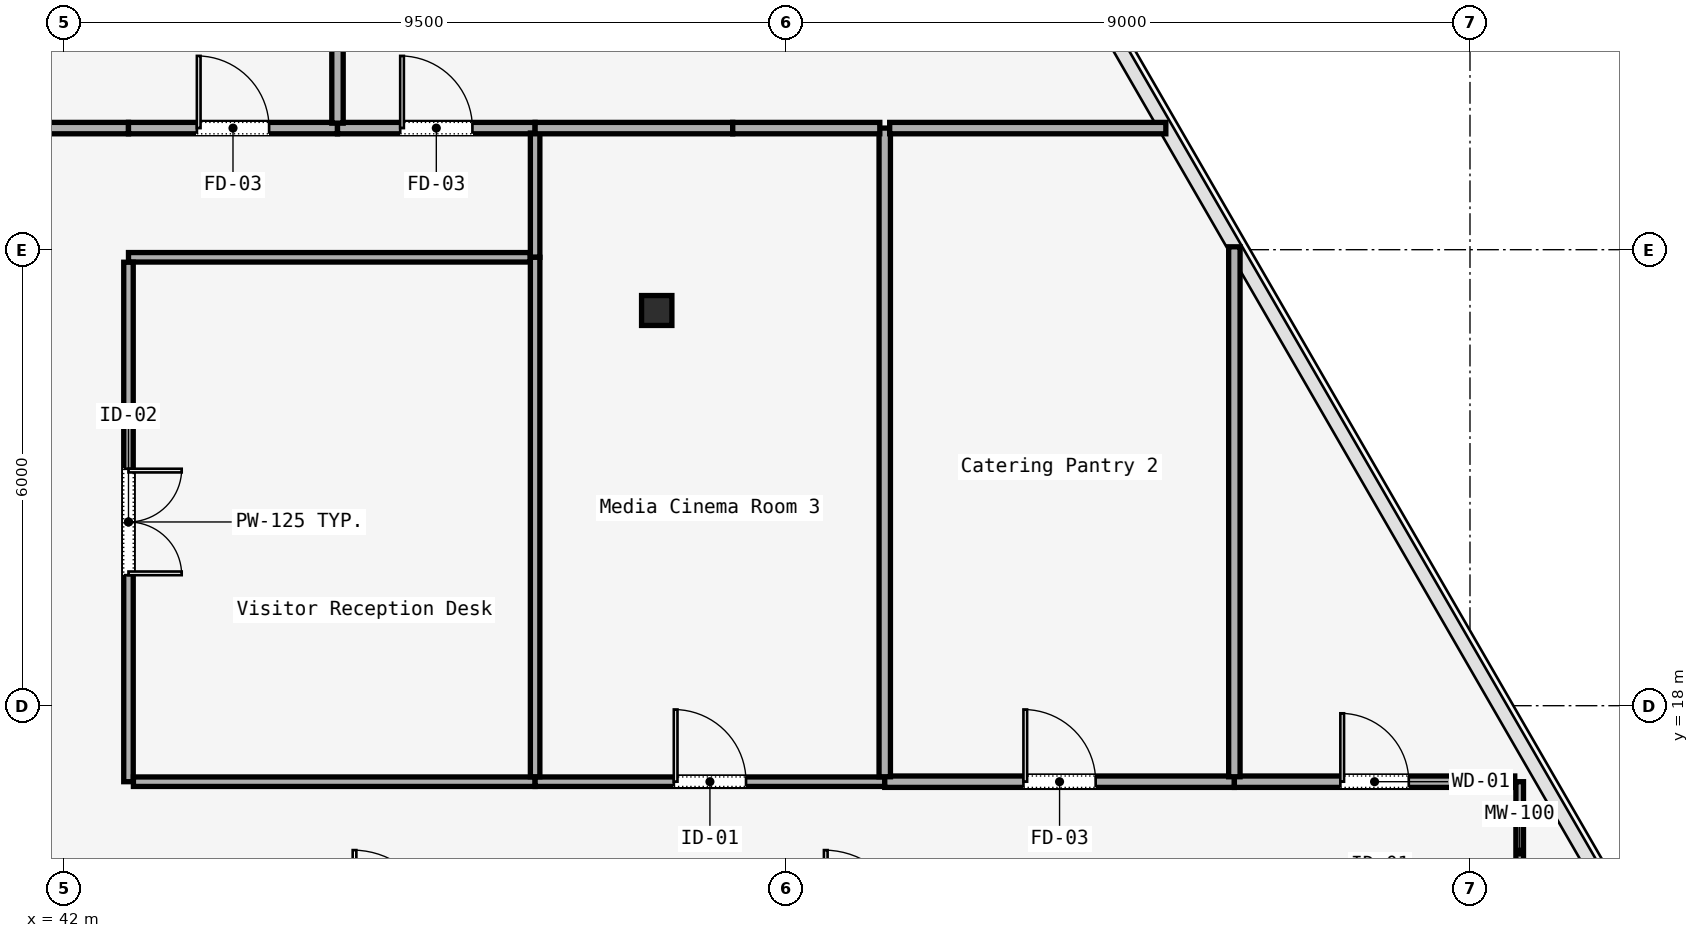
"""IFC4 building model, lengths in metres.
Left out: names, types, materials, properties, quantities, classifications, styles, units other than length and angle.
Written with IfcOpenShell. Run it as: python <this file> out.ifc"""

import sys

from ifc_helpers import new_model, si_unit, direction, frame, frame_2d, origin, origin_2d, place, context, subcontext, project, spatial, rectangle, i_section, extrude, element, fill, save


model = new_model("IFC4")
c1 = context("Model", 3, precision=1e-05, world=origin(), true_north=direction((0.0, 1.0)))
c2 = subcontext(c1, "Body", "Model", "MODEL_VIEW")
j1 = project(units=[si_unit("LENGTHUNIT", "METRE"), si_unit("PLANEANGLEUNIT", "RADIAN")], contexts=[c1])
p1 = place(None, origin())
s1 = spatial("IfcSite", under=j1, at=p1, CompositionType="ELEMENT")
p2 = place(p1, origin())
s2 = spatial("IfcBuilding", under=s1, at=p2, CompositionType="ELEMENT")
p3 = place(p2, frame((0.0, 0.0, 248.4)))
s3 = spatial("IfcBuildingStorey", under=s2, at=p3, CompositionType="ELEMENT", Elevation=248.4)
p4 = place(p3, frame((49.8, 23.2, 0.0), z_axis=(0.0, 0.0, 1.0), x_axis=(1.0, 0.0, 0.0)))
e1 = element("IfcColumn", 1, at=p4, inside=s3, PredefinedType="COLUMN", context=c2, shape_type="SweptSolid", body=[
    extrude(i_section(OverallWidth=0.399, OverallDepth=0.394, WebThickness=0.023, FlangeThickness=0.037, FilletRadius=0.015, at=origin_2d()), origin(), (0.0, 0.0, 1.0), 3.58),
])
p5 = place(p3, frame((61.154, 17.0, 0.0), z_axis=(0.0, 0.0, 1.0), x_axis=(0.0, -1.0, 0.0)))
e2 = element("IfcWall", 2, at=p5, inside=s3, PredefinedType="MOVABLE", context=c2, shape_type="SweptSolid", body=[
    extrude(rectangle(XDim=1.85, YDim=0.1, at=frame_2d((0.925, 0.0))), origin(), (0.0, 0.0, 1.0), 3.01),
])
p6 = place(p3, frame((41.15, 25.6, 0.0), z_axis=(0.0, 0.0, 1.0), x_axis=(1.0, 0.0, 0.0)))
e3 = element("IfcWall", 3, at=p6, inside=s3, PredefinedType="PARTITIONING", context=c2, shape_type="SweptSolid", body=[
    extrude(rectangle(XDim=1.7, YDim=0.15, at=frame_2d((0.85, 0.0))), origin(), (0.0, 0.0, 1.0), 3.01),
])
p7 = place(p3, frame((42.85, 25.6, 0.0), z_axis=(0.0, 0.0, 1.0), x_axis=(1.0, 0.0, 0.0)))
e4 = element("IfcWall", 4, at=p7, inside=s3, PredefinedType="PARTITIONING", context=c2, shape_type="SweptSolid", body=[
    extrude(rectangle(XDim=2.75, YDim=0.15, at=frame_2d((1.375, 0.0))), origin(), (0.0, 0.0, 1.0), 3.01),
])
p8 = place(p7, frame((0.9, 0.0, 0.0)))
e5 = element("IfcOpeningElement", 5, at=p8, cuts=e4, PredefinedType="OPENING", context=c2, shape_type="SweptSolid", body=[
    extrude(rectangle(XDim=0.95, YDim=2.2, at=frame_2d((0.475, 1.1))), frame((0.0, 0.075, 0.0), z_axis=(0.0, -1.0, 0.0), x_axis=(1.0, 0.0, 0.0)), (0.0, 0.0, 1.0), 0.15),
])
p9 = place(p3, frame((45.6, 25.6, 0.0), z_axis=(0.0, 0.0, 1.0), x_axis=(1.0, 0.0, 0.0)))
e6 = element("IfcWall", 6, at=p9, inside=s3, PredefinedType="PARTITIONING", context=c2, shape_type="SweptSolid", body=[
    extrude(rectangle(XDim=2.6, YDim=0.15, at=frame_2d((1.3, 0.0))), origin(), (0.0, 0.0, 1.0), 3.01),
])
p10 = place(p9, frame((0.825, 0.0, 0.0)))
e7 = element("IfcOpeningElement", 7, at=p10, cuts=e6, PredefinedType="OPENING", context=c2, shape_type="SweptSolid", body=[
    extrude(rectangle(XDim=0.95, YDim=2.2, at=frame_2d((0.475, 1.1))), frame((0.0, 0.075, 0.0), z_axis=(0.0, -1.0, 0.0), x_axis=(1.0, 0.0, 0.0)), (0.0, 0.0, 1.0), 0.15),
])
p11 = place(p3, frame((48.2, 25.535, 0.0), z_axis=(0.0, 0.0, 1.0), x_axis=(0.0, -1.0, 0.0)))
e8 = element("IfcWall", 8, at=p11, inside=s3, PredefinedType="PARTITIONING", context=c2, shape_type="SweptSolid", body=[
    extrude(rectangle(XDim=1.635, YDim=0.125, at=frame_2d((0.817, 0.0))), origin(), (0.0, 0.0, 1.0), 3.01),
])
p12 = place(p3, frame((48.135, 23.9, 0.0), z_axis=(0.0, 0.0, 1.0), x_axis=(-1.0, 0.0, 0.0)))
e9 = element("IfcWall", 9, at=p12, inside=s3, PredefinedType="PARTITIONING", context=c2, shape_type="SweptSolid", body=[
    extrude(rectangle(XDim=5.285, YDim=0.125, at=frame_2d((2.643, 0.0))), origin(), (0.0, 0.0, 1.0), 3.01),
])
p13 = place(p3, frame((42.85, 23.835, 0.0), z_axis=(0.0, 0.0, 1.0), x_axis=(0.0, -1.0, 0.0)))
e10 = element("IfcWall", 10, at=p13, inside=s3, PredefinedType="PARTITIONING", context=c2, shape_type="SweptSolid", body=[
    extrude(rectangle(XDim=6.835, YDim=0.125, at=frame_2d((3.417, 0.0))), origin(), (0.0, 0.0, 1.0), 3.01),
])
p14 = place(p13, frame((2.718, 0.0, 0.0)))
e11 = element("IfcOpeningElement", 11, at=p14, cuts=e10, PredefinedType="OPENING", context=c2, shape_type="SweptSolid", body=[
    extrude(rectangle(XDim=1.4, YDim=2.2, at=frame_2d((0.7, 1.1))), frame((0.0, 0.062, 0.0), z_axis=(0.0, -1.0, 0.0), x_axis=(1.0, 0.0, 0.0)), (0.0, 0.0, 1.0), 0.125),
])
p15 = place(p3, frame((42.915, 17.0, 0.0), z_axis=(0.0, 0.0, 1.0), x_axis=(1.0, 0.0, 0.0)))
e12 = element("IfcWall", 12, at=p15, inside=s3, PredefinedType="PARTITIONING", context=c2, shape_type="SweptSolid", body=[
    extrude(rectangle(XDim=5.285, YDim=0.125, at=frame_2d((2.643, 0.0))), origin(), (0.0, 0.0, 1.0), 3.01),
])
p16 = place(p3, frame((48.2, 17.0, 0.0), z_axis=(0.0, 0.0, 1.0), x_axis=(1.0, 0.0, 0.0)))
e13 = element("IfcWall", 13, at=p16, inside=s3, PredefinedType="PARTITIONING", context=c2, shape_type="SweptSolid", body=[
    extrude(rectangle(XDim=4.6, YDim=0.125, at=frame_2d((2.3, 0.0))), origin(), (0.0, 0.0, 1.0), 3.01),
])
p17 = place(p16, frame((1.825, 0.0, 0.0)))
e14 = element("IfcOpeningElement", 14, at=p17, cuts=e13, PredefinedType="OPENING", context=c2, shape_type="SweptSolid", body=[
    extrude(rectangle(XDim=0.95, YDim=2.2, at=frame_2d((0.475, 1.1))), frame((0.0, 0.062, 0.0), z_axis=(0.0, -1.0, 0.0), x_axis=(1.0, 0.0, 0.0)), (0.0, 0.0, 1.0), 0.125),
])
p18 = place(p3, frame((52.8, 17.0, 0.0), z_axis=(0.0, 0.0, 1.0), x_axis=(1.0, 0.0, 0.0)))
e15 = element("IfcWall", 15, at=p18, inside=s3, PredefinedType="PARTITIONING", context=c2, shape_type="SweptSolid", body=[
    extrude(rectangle(XDim=4.6, YDim=0.15, at=frame_2d((2.3, 0.0))), origin(), (0.0, 0.0, 1.0), 3.01),
])
p19 = place(p18, frame((1.825, 0.0, 0.0)))
e16 = element("IfcOpeningElement", 16, at=p19, cuts=e15, PredefinedType="OPENING", context=c2, shape_type="SweptSolid", body=[
    extrude(rectangle(XDim=0.95, YDim=2.2, at=frame_2d((0.475, 1.1))), frame((0.0, 0.075, 0.0), z_axis=(0.0, -1.0, 0.0), x_axis=(1.0, 0.0, 0.0)), (0.0, 0.0, 1.0), 0.15),
])
p20 = place(p3, frame((57.4, 17.0, 0.0), z_axis=(0.0, 0.0, 1.0), x_axis=(1.0, 0.0, 0.0)))
e17 = element("IfcWall", 17, at=p20, inside=s3, PredefinedType="PARTITIONING", context=c2, shape_type="SweptSolid", body=[
    extrude(rectangle(XDim=3.689, YDim=0.15, at=frame_2d((1.845, 0.0))), origin(), (0.0, 0.0, 1.0), 3.01),
])
p21 = place(p20, frame((1.395, 0.0, 0.0)))
e18 = element("IfcOpeningElement", 18, at=p21, cuts=e17, PredefinedType="OPENING", context=c2, shape_type="SweptSolid", body=[
    extrude(rectangle(XDim=0.9, YDim=2.15, at=frame_2d((0.45, 1.075))), frame((0.0, 0.075, 0.0), z_axis=(0.0, -1.0, 0.0), x_axis=(1.0, 0.0, 0.0)), (0.0, 0.0, 1.0), 0.15),
])
p22 = place(p3, frame((57.4, 17.065, 0.0), z_axis=(0.0, 0.0, 1.0), x_axis=(0.0, 1.0, 0.0)))
e19 = element("IfcWall", 19, at=p22, inside=s3, PredefinedType="PARTITIONING", context=c2, shape_type="SweptSolid", body=[
    extrude(rectangle(XDim=6.973, YDim=0.15, at=frame_2d((3.487, 0.0))), origin(), (0.0, 0.0, 1.0), 3.01),
])
p23 = place(p3, frame((48.2, 23.9, 0.0), z_axis=(0.0, 0.0, 1.0), x_axis=(0.0, -1.0, 0.0)))
e20 = element("IfcWall", 20, at=p23, inside=s3, PredefinedType="PARTITIONING", context=c2, shape_type="SweptSolid", body=[
    extrude(rectangle(XDim=6.835, YDim=0.125, at=frame_2d((3.417, 0.0))), origin(), (0.0, 0.0, 1.0), 3.01),
])
p24 = place(p3, frame((52.8, 17.065, 0.0), z_axis=(0.0, 0.0, 1.0), x_axis=(0.0, 1.0, 0.0)))
e21 = element("IfcWall", 21, at=p24, inside=s3, PredefinedType="PARTITIONING", context=c2, shape_type="SweptSolid", body=[
    extrude(rectangle(XDim=8.535, YDim=0.15, at=frame_2d((4.268, 0.0))), origin(), (0.0, 0.0, 1.0), 3.01),
])
p25 = place(p3, frame((52.865, 25.6, 0.0), z_axis=(0.0, 0.0, 1.0), x_axis=(1.0, 0.0, 0.0)))
e22 = element("IfcWall", 22, at=p25, inside=s3, PredefinedType="PARTITIONING", context=c2, shape_type="SweptSolid", body=[
    extrude(rectangle(XDim=3.633, YDim=0.15, at=frame_2d((1.817, 0.0))), origin(), (0.0, 0.0, 1.0), 3.01),
])
p26 = place(p3, frame((48.2, 25.6, 0.0), z_axis=(0.0, 0.0, 1.0), x_axis=(1.0, 0.0, 0.0)))
e23 = element("IfcWall", 23, at=p26, inside=s3, PredefinedType="PARTITIONING", context=c2, shape_type="SweptSolid", body=[
    extrude(rectangle(XDim=2.6, YDim=0.15, at=frame_2d((1.3, 0.0))), origin(), (0.0, 0.0, 1.0), 3.01),
])
p27 = place(p3, frame((50.8, 25.6, 0.0), z_axis=(0.0, 0.0, 1.0), x_axis=(1.0, 0.0, 0.0)))
e24 = element("IfcWall", 24, at=p27, inside=s3, PredefinedType="PARTITIONING", context=c2, shape_type="SweptSolid", body=[
    extrude(rectangle(XDim=1.935, YDim=0.15, at=frame_2d((0.968, 0.0))), origin(), (0.0, 0.0, 1.0), 3.01),
])
p28 = place(p3, frame((45.6, 25.665, 0.0), z_axis=(0.0, 0.0, 1.0), x_axis=(0.0, 1.0, 0.0)))
e25 = element("IfcWall", 25, at=p28, inside=s3, PredefinedType="PARTITIONING", context=c2, shape_type="SweptSolid", body=[
    extrude(rectangle(XDim=18.811, YDim=0.15, at=frame_2d((9.406, 0.0))), origin(), (0.0, 0.0, 1.0), 3.01),
])
p29 = place(p21, origin())
e26 = element("IfcDoor", 26, at=p29, inside=s3, OperationType="SINGLE_SWING_LEFT", PredefinedType="DOOR", context=c2, shape_type="SweptSolid", body=[
    extrude(rectangle(XDim=0.9, YDim=2.15, at=frame_2d((0.45, 1.075))), frame((0.0, 0.025, 0.0), z_axis=(0.0, -1.0, 0.0), x_axis=(1.0, 0.0, 0.0)), (0.0, 0.0, 1.0), 0.05),
])
fill(e18, e26)
p30 = place(p14, origin())
e27 = element("IfcDoor", 27, at=p30, inside=s3, OperationType="SINGLE_SWING_RIGHT", PredefinedType="DOOR", context=c2, shape_type="SweptSolid", body=[
    extrude(rectangle(XDim=1.4, YDim=2.2, at=frame_2d((0.7, 1.1))), frame((0.0, 0.025, 0.0), z_axis=(0.0, -1.0, 0.0), x_axis=(1.0, 0.0, 0.0)), (0.0, 0.0, 1.0), 0.05),
])
fill(e11, e27)
p31 = place(p19, origin())
e28 = element("IfcDoor", 28, at=p31, inside=s3, OperationType="SINGLE_SWING_LEFT", PredefinedType="DOOR", context=c2, shape_type="SweptSolid", body=[
    extrude(rectangle(XDim=0.95, YDim=2.2, at=frame_2d((0.475, 1.1))), frame((0.0, 0.025, 0.0), z_axis=(0.0, -1.0, 0.0), x_axis=(1.0, 0.0, 0.0)), (0.0, 0.0, 1.0), 0.05),
])
fill(e16, e28)
p32 = place(p17, origin())
e29 = element("IfcDoor", 29, at=p32, inside=s3, OperationType="SINGLE_SWING_RIGHT", PredefinedType="DOOR", context=c2, shape_type="SweptSolid", body=[
    extrude(rectangle(XDim=0.95, YDim=2.2, at=frame_2d((0.475, 1.1))), frame((0.0, 0.025, 0.0), z_axis=(0.0, -1.0, 0.0), x_axis=(1.0, 0.0, 0.0)), (0.0, 0.0, 1.0), 0.05),
])
fill(e14, e29)
p33 = place(p10, origin())
e30 = element("IfcDoor", 30, at=p33, inside=s3, OperationType="SINGLE_SWING_LEFT", PredefinedType="DOOR", context=c2, shape_type="SweptSolid", body=[
    extrude(rectangle(XDim=0.95, YDim=2.2, at=frame_2d((0.475, 1.1))), frame((0.0, 0.025, 0.0), z_axis=(0.0, -1.0, 0.0), x_axis=(1.0, 0.0, 0.0)), (0.0, 0.0, 1.0), 0.05),
])
fill(e7, e30)
p34 = place(p8, origin())
e31 = element("IfcDoor", 31, at=p34, inside=s3, OperationType="SINGLE_SWING_LEFT", PredefinedType="DOOR", context=c2, shape_type="SweptSolid", body=[
    extrude(rectangle(XDim=0.95, YDim=2.2, at=frame_2d((0.475, 1.1))), frame((0.0, 0.025, 0.0), z_axis=(0.0, -1.0, 0.0), x_axis=(1.0, 0.0, 0.0)), (0.0, 0.0, 1.0), 0.05),
])
fill(e5, e31)
save(model, sys.argv[1])
